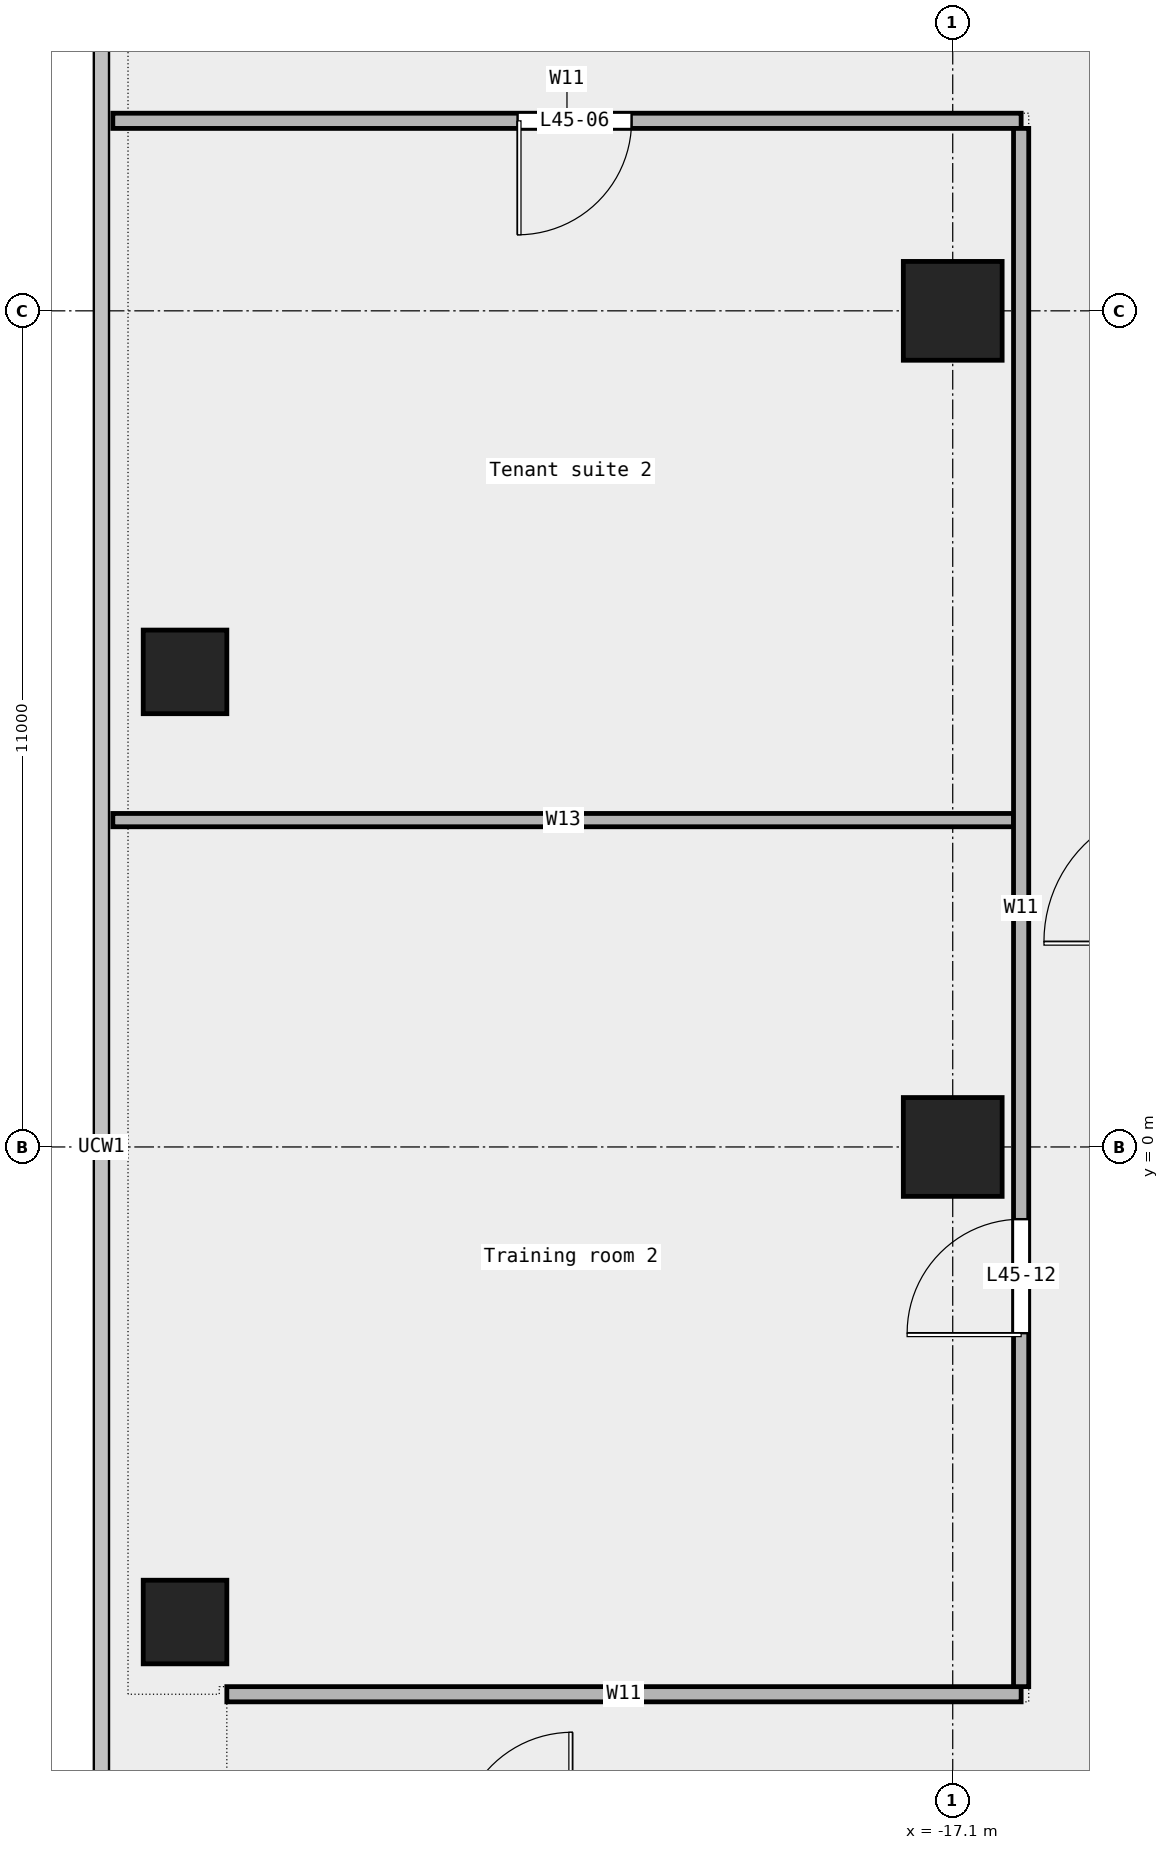
"""IFC4 building model, lengths in metres.
Left out: names, types, materials, properties, quantities, classifications, styles, units other than length and angle.
Written with IfcOpenShell. Run it as: python <this file> out.ifc"""

import sys

from ifc_helpers import new_model, si_unit, direction, frame, frame_2d, origin, origin_2d, place, context, subcontext, project, spatial, rectangle, extrude, element, fill, save


model = new_model("IFC4")
c1 = context("Model", 3, precision=1e-05, world=origin(), true_north=direction((0.0, 1.0)))
c2 = subcontext(c1, "Body", "Model", "MODEL_VIEW")
j1 = project(units=[si_unit("LENGTHUNIT", "METRE"), si_unit("PLANEANGLEUNIT", "RADIAN")], contexts=[c1])
p1 = place(None, origin())
s1 = spatial("IfcSite", under=j1, at=p1, CompositionType="ELEMENT")
p2 = place(p1, origin())
s2 = spatial("IfcBuilding", under=s1, at=p2, CompositionType="ELEMENT")
p3 = place(p2, frame((0.0, 0.0, 215.0)))
s3 = spatial("IfcBuildingStorey", under=s2, at=p3, CompositionType="ELEMENT", Elevation=215.0)
for number, where, z_axis, x_axis in (
    (1, (-27.2, 6.25, 0.0), (0.0, 0.0, 1.0), (1.0, 0.0, 0.0)),
    (2, (-27.2, -6.25, 0.0), (0.0, 0.0, 1.0), (1.0, 0.0, 0.0)),
):
    element("IfcColumn", number, at=place(p3, frame(where, z_axis=z_axis, x_axis=x_axis)), inside=s3, PredefinedType="COLUMN", context=c2, shape_type="SweptSolid", body=[
        extrude(rectangle(XDim=1.1, YDim=1.1, at=origin_2d()), origin(), (0.0, 0.0, 1.0), 3.6),
    ])
for number, where, z_axis, x_axis in (
    (3, (-17.1, 0.0, 0.0), (0.0, 0.0, 1.0), (1.0, 0.0, 0.0)),
    (4, (-17.1, 11.0, 0.0), (0.0, 0.0, 1.0), (1.0, 0.0, 0.0)),
):
    element("IfcColumn", number, at=place(p3, frame(where, z_axis=z_axis, x_axis=x_axis)), inside=s3, PredefinedType="COLUMN", context=c2, shape_type="SweptSolid", body=[
        extrude(rectangle(XDim=1.3, YDim=1.3, at=origin_2d()), origin(), (0.0, 0.0, 1.0), 3.6),
    ])
p4 = place(p3, frame((-26.65, -7.2, 0.0), z_axis=(0.0, 0.0, 1.0), x_axis=(1.0, 0.0, 0.0)))
e5 = element("IfcWall", 5, at=p4, inside=s3, PredefinedType="PARTITIONING", context=c2, shape_type="SweptSolid", body=[
    extrude(rectangle(XDim=10.45, YDim=0.2, at=frame_2d((5.225, 0.0))), origin(), (0.0, 0.0, 1.0), 3.6),
])
p5 = place(p3, frame((-28.15, 4.3, 0.0), z_axis=(0.0, 0.0, 1.0), x_axis=(1.0, 0.0, 0.0)))
e6 = element("IfcWall", 6, at=p5, inside=s3, PredefinedType="PARTITIONING", context=c2, shape_type="SweptSolid", body=[
    extrude(rectangle(XDim=11.85, YDim=0.175, at=frame_2d((5.925, 0.0))), origin(), (0.0, 0.0, 1.0), 3.6),
])
p6 = place(p3, frame((-28.15, 13.5, 0.0), z_axis=(0.0, 0.0, 1.0), x_axis=(1.0, 0.0, 0.0)))
e7 = element("IfcWall", 7, at=p6, inside=s3, PredefinedType="PARTITIONING", context=c2, shape_type="SweptSolid", body=[
    extrude(rectangle(XDim=11.95, YDim=0.2, at=frame_2d((5.975, 0.0))), origin(), (0.0, 0.0, 1.0), 3.6),
])
p7 = place(p6, frame((5.325, 0.0, 0.0)))
e8 = element("IfcOpeningElement", 8, at=p7, cuts=e7, PredefinedType="OPENING", context=c2, shape_type="SweptSolid", body=[
    extrude(rectangle(XDim=1.5, YDim=2.1, at=frame_2d((0.75, 1.05))), frame((0.0, 0.112, 0.0), z_axis=(0.0, -1.0, 0.0), x_axis=(1.0, 0.0, 0.0)), (0.0, 0.0, 1.0), 0.224),
])
p8 = place(p3, frame((-16.2, -7.1, 0.0), z_axis=(0.0, 0.0, 1.0), x_axis=(0.0, 1.0, 0.0)))
e9 = element("IfcWall", 9, at=p8, inside=s3, PredefinedType="PARTITIONING", context=c2, shape_type="SweptSolid", body=[
    extrude(rectangle(XDim=20.5, YDim=0.2, at=frame_2d((10.25, 0.0))), origin(), (0.0, 0.0, 1.0), 3.6),
])
p9 = place(p8, frame((4.65, 0.0, 0.0)))
e10 = element("IfcOpeningElement", 10, at=p9, cuts=e9, PredefinedType="OPENING", context=c2, shape_type="SweptSolid", body=[
    extrude(rectangle(XDim=1.5, YDim=2.1, at=frame_2d((0.75, 1.05))), frame((0.0, 0.112, 0.0), z_axis=(0.0, -1.0, 0.0), x_axis=(1.0, 0.0, 0.0)), (0.0, 0.0, 1.0), 0.224),
])
p10 = place(p7, origin())
e11 = element("IfcDoor", 11, at=p10, inside=s3, OperationType="DOUBLE_DOOR_SINGLE_SWING", PredefinedType="DOOR", context=c2, shape_type="SweptSolid", body=[
    extrude(rectangle(XDim=1.5, YDim=2.1, at=frame_2d((0.75, 1.05))), frame((0.0, 0.025, 0.0), z_axis=(0.0, -1.0, 0.0), x_axis=(1.0, 0.0, 0.0)), (0.0, 0.0, 1.0), 0.05),
])
fill(e8, e11)
p11 = place(p9, origin())
e12 = element("IfcDoor", 12, at=p11, inside=s3, OperationType="DOUBLE_DOOR_SINGLE_SWING", PredefinedType="DOOR", context=c2, shape_type="SweptSolid", body=[
    extrude(rectangle(XDim=1.5, YDim=2.1, at=frame_2d((0.75, 1.05))), frame((0.0, 0.025, 0.0), z_axis=(0.0, -1.0, 0.0), x_axis=(1.0, 0.0, 0.0)), (0.0, 0.0, 1.0), 0.05),
])
fill(e10, e12)
save(model, sys.argv[1])
